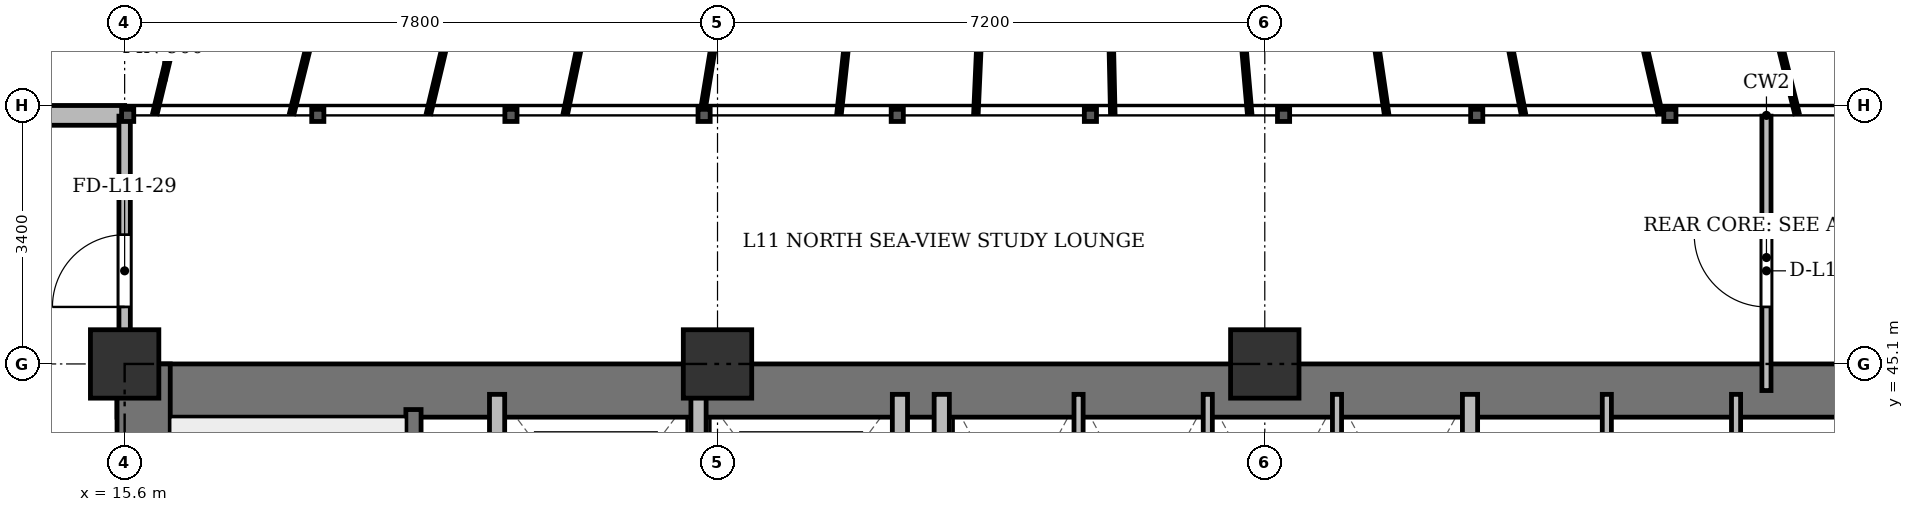
"""IFC4 building model, lengths in metres.
Left out: names, types, materials, properties, quantities, classifications, styles, units other than length and angle.
Written with IfcOpenShell. Run it as: python <this file> out.ifc"""

import sys

from ifc_helpers import new_model, si_unit, direction, frame, frame_2d, origin, origin_2d, place, context, subcontext, project, spatial, rectangle, extrude, source, transform, mapped, element, fill, save


model = new_model("IFC4")
c1 = context("Model", 3, precision=1e-05, world=origin(), true_north=direction((0.0, 1.0)))
c2 = subcontext(c1, "Body", "Model", "MODEL_VIEW")
j1 = project(units=[si_unit("LENGTHUNIT", "METRE"), si_unit("PLANEANGLEUNIT", "RADIAN")], contexts=[c1])
p1 = place(None, origin())
s1 = spatial("IfcSite", under=j1, at=p1, CompositionType="ELEMENT")
p2 = place(p1, origin())
s2 = spatial("IfcBuilding", under=s1, at=p2, CompositionType="ELEMENT")
p3 = place(p2, frame((0.0, 0.0, 45.1)))
s3 = spatial("IfcBuildingStorey", under=s2, at=p3, CompositionType="ELEMENT", Elevation=45.1)
m1 = source(origin(), c2, "Body", "SweptSolid", [
    extrude(rectangle(XDim=0.9, YDim=0.9, at=origin_2d()), origin(), (0.0, 0.0, 1.0), 3.6),
])
for number, where, z_axis, x_axis in (
    (1, (15.6, 45.1, 0.0), (0.0, 0.0, 1.0), (1.0, 0.0, 0.0)),
    (2, (23.4, 45.1, 0.0), (0.0, 0.0, 1.0), (1.0, 0.0, 0.0)),
    (3, (30.6, 45.1, 0.0), (0.0, 0.0, 1.0), (1.0, 0.0, 0.0)),
):
    element("IfcColumn", number, at=place(p3, frame(where, z_axis=z_axis, x_axis=x_axis)), inside=s3, PredefinedType="COLUMN", context=c2, shape_type="MappedRepresentation", body=[
        mapped(m1, transform((0.0, 0.0, 0.0), x_axis=(1.0, 0.0, 0.0), y_axis=(0.0, 1.0, 0.0), z_axis=(0.0, 0.0, 1.0), scale=1.0)),
    ])
p4 = place(p3, frame((7.6, 48.37, 0.0), z_axis=(0.0, 0.0, 1.0), x_axis=(1.0, 0.0, 0.0)))
e4 = element("IfcWall", 4, at=p4, inside=s3, PredefinedType="SOLIDWALL", context=c2, shape_type="SweptSolid", body=[
    extrude(rectangle(XDim=8.0, YDim=0.26, at=frame_2d((4.0, 0.0))), origin(), (0.0, 0.0, 1.0), 3.34),
])
p5 = place(p4, frame((3.325, 0.0, 0.9)))
e5 = element("IfcOpeningElement", 5, at=p5, cuts=e4, PredefinedType="OPENING", context=c2, shape_type="SweptSolid", body=[
    extrude(rectangle(XDim=1.35, YDim=1.5, at=frame_2d((0.675, 0.75))), frame((0.0, 0.14, 0.0), z_axis=(0.0, -1.0, 0.0), x_axis=(1.0, 0.0, 0.0)), (0.0, 0.0, 1.0), 0.28),
])
p6 = place(p3, frame((15.5, 44.75, 0.0), z_axis=(0.0, 0.0, 1.0), x_axis=(1.0, 0.0, 0.0)))
e6 = element("IfcWall", 6, at=p6, inside=s3, PredefinedType="SHEAR", context=c2, shape_type="SweptSolid", body=[
    extrude(rectangle(XDim=43.4, YDim=0.7, at=frame_2d((21.7, 0.0))), origin(), (0.0, 0.0, 1.0), 3.34),
])
p7 = place(p3, frame((15.85, 33.4, 0.0), z_axis=(0.0, 0.0, 1.0), x_axis=(0.0, 1.0, 0.0)))
e7 = element("IfcWall", 7, at=p7, inside=s3, PredefinedType="SHEAR", context=c2, shape_type="SweptSolid", body=[
    extrude(rectangle(XDim=11.7, YDim=0.7, at=frame_2d((5.85, 0.0))), origin(), (0.0, 0.0, 1.0), 3.34),
])
p8 = place(p3, frame((19.4, 33.4, 0.0), z_axis=(0.0, 0.0, 1.0), x_axis=(0.0, 1.0, 0.0)))
e8 = element("IfcWall", 8, at=p8, inside=s3, PredefinedType="SHEAR", context=c2, shape_type="SweptSolid", body=[
    extrude(rectangle(XDim=11.1, YDim=0.2, at=frame_2d((5.55, 0.0))), origin(), (0.0, 0.0, 1.0), 3.34),
])
p9 = place(p8, frame((0.85, 0.0, 0.0)))
e9 = element("IfcOpeningElement", 9, at=p9, cuts=e8, PredefinedType="OPENING", context=c2, shape_type="SweptSolid", body=[
    extrude(rectangle(XDim=1.1, YDim=2.15, at=frame_2d((0.55, 1.075))), frame((0.0, 0.11, 0.0), z_axis=(0.0, -1.0, 0.0), x_axis=(1.0, 0.0, 0.0)), (0.0, 0.0, 1.0), 0.22),
])
for number, where, z_axis, x_axis in (
    (10, (20.5, 41.3, 0.0), (0.0, 0.0, 1.0), (0.0, 1.0, 0.0)),
    (11, (23.15, 41.3, 0.0), (0.0, 0.0, 1.0), (0.0, 1.0, 0.0)),
    (12, (25.8, 41.3, 0.0), (0.0, 0.0, 1.0), (0.0, 1.0, 0.0)),
):
    element("IfcWall", number, at=place(p3, frame(where, z_axis=z_axis, x_axis=x_axis)), inside=s3, PredefinedType="SOLIDWALL", context=c2, shape_type="SweptSolid", body=[
        extrude(rectangle(XDim=3.4, YDim=0.2, at=frame_2d((1.7, 0.0))), origin(), (0.0, 0.0, 1.0), 3.34),
    ])
p10 = place(p3, frame((26.35, 33.4, 0.0), z_axis=(0.0, 0.0, 1.0), x_axis=(0.0, 1.0, 0.0)))
e13 = element("IfcWall", 13, at=p10, inside=s3, PredefinedType="SOLIDWALL", context=c2, shape_type="SweptSolid", body=[
    extrude(rectangle(XDim=11.3, YDim=0.2, at=frame_2d((5.65, 0.0))), origin(), (0.0, 0.0, 1.0), 2.69),
])
p11 = place(p3, frame((33.3, 41.5, 0.0), z_axis=(0.0, 0.0, 1.0), x_axis=(0.0, 1.0, 0.0)))
e14 = element("IfcWall", 14, at=p11, inside=s3, PredefinedType="SOLIDWALL", context=c2, shape_type="SweptSolid", body=[
    extrude(rectangle(XDim=3.2, YDim=0.2, at=frame_2d((1.6, 0.0))), origin(), (0.0, 0.0, 1.0), 3.34),
])
for number, where, z_axis, x_axis in (
    (15, (28.15, 41.5, 0.0), (0.0, 0.0, 1.0), (0.0, 1.0, 0.0)),
    (16, (29.85, 41.5, 0.0), (0.0, 0.0, 1.0), (0.0, 1.0, 0.0)),
    (17, (31.55, 41.5, 0.0), (0.0, 0.0, 1.0), (0.0, 1.0, 0.0)),
    (18, (35.1, 41.5, 0.0), (0.0, 0.0, 1.0), (0.0, 1.0, 0.0)),
    (19, (36.8, 41.5, 0.0), (0.0, 0.0, 1.0), (0.0, 1.0, 0.0)),
):
    element("IfcWall", number, at=place(p3, frame(where, z_axis=z_axis, x_axis=x_axis)), inside=s3, PredefinedType="PARTITIONING", context=c2, shape_type="SweptSolid", body=[
        extrude(rectangle(XDim=3.2, YDim=0.12, at=frame_2d((1.6, 0.0))), origin(), (0.0, 0.0, 1.0), 3.34),
    ])
p12 = place(p3, frame((37.2, 44.75, 0.0), z_axis=(0.0, 0.0, 1.0), x_axis=(0.0, 1.0, 0.0)))
e20 = element("IfcWall", 20, at=p12, inside=s3, PredefinedType="PARTITIONING", context=c2, shape_type="SweptSolid", body=[
    extrude(rectangle(XDim=3.61, YDim=0.12, at=frame_2d((1.805, 0.0))), origin(), (0.0, 0.0, 1.0), 2.69),
])
p13 = place(p12, frame((1.1, 0.0, 0.0)))
e21 = element("IfcOpeningElement", 21, at=p13, cuts=e20, PredefinedType="OPENING", context=c2, shape_type="SweptSolid", body=[
    extrude(rectangle(XDim=0.95, YDim=2.15, at=frame_2d((0.475, 1.075))), frame((0.0, 0.07, 0.0), z_axis=(0.0, -1.0, 0.0), x_axis=(1.0, 0.0, 0.0)), (0.0, 0.0, 1.0), 0.14),
])
p14 = place(p3, frame((15.6, 44.75, 0.0), z_axis=(0.0, 0.0, 1.0), x_axis=(0.0, 1.0, 0.0)))
e22 = element("IfcWall", 22, at=p14, inside=s3, PredefinedType="PARTITIONING", context=c2, shape_type="SweptSolid", body=[
    extrude(rectangle(XDim=3.61, YDim=0.15, at=frame_2d((1.805, 0.0))), origin(), (0.0, 0.0, 1.0), 2.752),
])
p15 = place(p14, frame((1.1, 0.0, 0.0)))
e23 = element("IfcOpeningElement", 23, at=p15, cuts=e22, PredefinedType="OPENING", context=c2, shape_type="SweptSolid", body=[
    extrude(rectangle(XDim=0.95, YDim=2.15, at=frame_2d((0.475, 1.075))), frame((0.0, 0.085, 0.0), z_axis=(0.0, -1.0, 0.0), x_axis=(1.0, 0.0, 0.0)), (0.0, 0.0, 1.0), 0.17),
])
m2 = source(origin(), c2, "Body", "SweptSolid", [
    extrude(rectangle(XDim=0.95, YDim=2.15, at=frame_2d((0.475, 1.075))), frame((0.0, 0.025, 0.0), z_axis=(0.0, -1.0, 0.0), x_axis=(1.0, 0.0, 0.0)), (0.0, 0.0, 1.0), 0.05),
])
p16 = place(p13, origin())
e24 = element("IfcDoor", 24, at=p16, inside=s3, OperationType="SINGLE_SWING_RIGHT", PredefinedType="DOOR", context=c2, shape_type="MappedRepresentation", body=[
    mapped(m2, transform((0.0, 0.0, 0.0), x_axis=(1.0, 0.0, 0.0), y_axis=(0.0, 1.0, 0.0), z_axis=(0.0, 0.0, 1.0), scale=1.0)),
])
fill(e21, e24)
p17 = place(p15, origin())
e25 = element("IfcDoor", 25, at=p17, inside=s3, OperationType="SINGLE_SWING_LEFT", PredefinedType="DOOR", context=c2, shape_type="MappedRepresentation", body=[
    mapped(m2, transform((0.0, 0.0, 0.0), x_axis=(1.0, 0.0, 0.0), y_axis=(0.0, 1.0, 0.0), z_axis=(0.0, 0.0, 1.0), scale=1.0)),
])
fill(e23, e25)
save(model, sys.argv[1])
